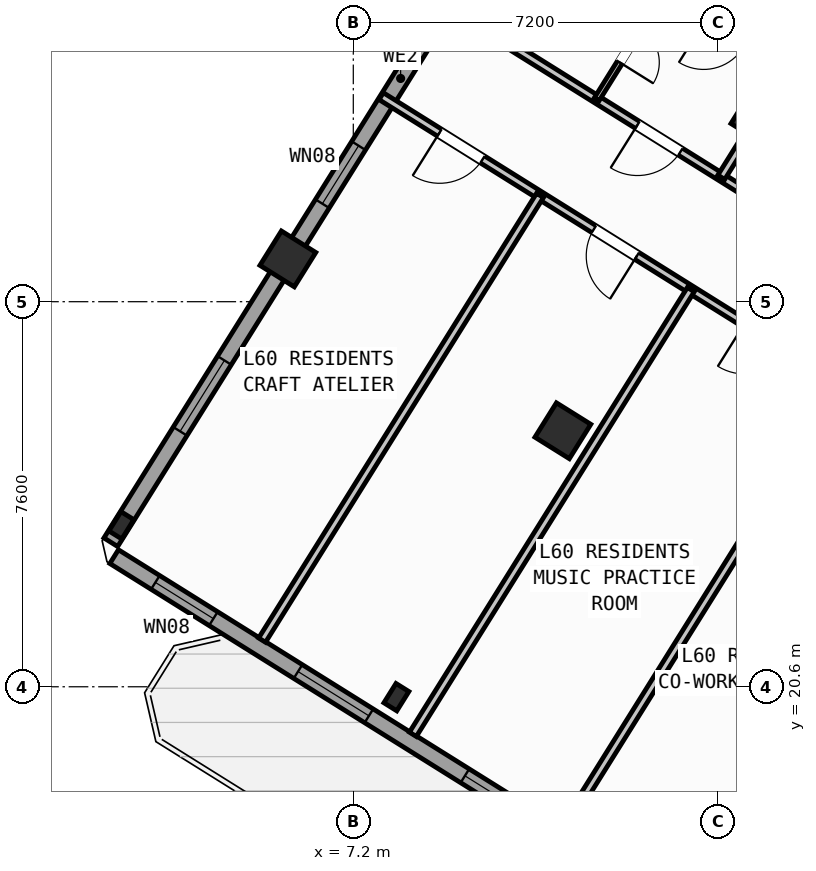
"""IFC4 building model, lengths in metres.
Left out: names, types, materials, properties, quantities, classifications, styles, units other than length and angle.
Written with IfcOpenShell. Run it as: python <this file> out.ifc"""

import sys

from ifc_helpers import new_model, si_unit, direction, frame, frame_2d, origin, origin_2d, place, context, subcontext, project, spatial, rectangle, hollow_rectangle, i_section, extrude, source, transform, mapped, element, fill, save


model = new_model("IFC4")
c1 = context("Model", 3, precision=1e-05, world=origin(), true_north=direction((0.0, 1.0)))
c2 = subcontext(c1, "Body", "Model", "MODEL_VIEW")
j1 = project(units=[si_unit("LENGTHUNIT", "METRE"), si_unit("PLANEANGLEUNIT", "RADIAN")], contexts=[c1])
p1 = place(None, origin())
s1 = spatial("IfcSite", under=j1, at=p1, CompositionType="ELEMENT")
p2 = place(p1, origin())
s2 = spatial("IfcBuilding", under=s1, at=p2, CompositionType="ELEMENT")
p3 = place(p2, frame((0.0, 0.0, 238.5)))
s3 = spatial("IfcBuildingStorey", under=s2, at=p3, CompositionType="ELEMENT", Elevation=238.5)
m1 = source(origin(), c2, "Body", "SweptSolid", [
    extrude(hollow_rectangle(XDim=0.8, YDim=0.8, WallThickness=0.032, at=origin_2d()), origin(), (0.0, 0.0, 1.0), 3.6),
])
for number, where, z_axis, x_axis in (
    (1, (15.205, 31.844, 0.0), (0.0, 0.0, 1.0), (-0.848, 0.53, 0.0)),
    (2, (11.336, 25.653, 0.0), (0.0, 0.0, 1.0), (-0.848, 0.53, 0.0)),
):
    element("IfcColumn", number, at=place(p3, frame(where, z_axis=z_axis, x_axis=x_axis)), inside=s3, PredefinedType="COLUMN", context=c2, shape_type="MappedRepresentation", body=[
        mapped(m1, transform((0.0, 0.0, 0.0), scale=1.0)),
    ])
m2 = source(origin(), c2, "Body", "SweptSolid", [
    extrude(i_section(OverallWidth=0.3, OverallDepth=0.45, WebThickness=0.014, FlangeThickness=0.026, at=origin_2d()), origin(), (0.0, 0.0, 1.0), 3.6),
])
p4 = place(p3, frame((8.051, 20.395, 0.0), z_axis=(0.0, 0.0, 1.0), x_axis=(-0.848048096156, 0.529919264233, 0.0)))
e3 = element("IfcColumn", 3, at=p4, inside=s3, PredefinedType="COLUMN", context=c2, shape_type="MappedRepresentation", body=[
    mapped(m2, transform((0.0, 0.0, 0.0), scale=1.0)),
])
p5 = place(p3, frame((5.909, 29.044, 0.0), z_axis=(0.0, 0.0, 1.0), x_axis=(-0.848048096156, 0.529919264233, 0.0)))
e4 = element("IfcColumn", 4, at=p5, inside=s3, PredefinedType="COLUMN", context=c2, shape_type="MappedRepresentation", body=[
    mapped(m1, transform((0.0, 0.0, 0.0), scale=1.0)),
])
p6 = place(p3, frame((2.623, 23.786, 0.0), z_axis=(0.0, 0.0, 1.0), x_axis=(-0.848048096156, 0.529919264233, 0.0)))
e5 = element("IfcColumn", 5, at=p6, inside=s3, PredefinedType="COLUMN", context=c2, shape_type="MappedRepresentation", body=[
    mapped(m2, transform((0.0, 0.0, 0.0), scale=1.0)),
])
p7 = place(p3, frame((29.268, 6.429, 0.0), z_axis=(0.0, 0.0, 1.0), x_axis=(-0.848049971435, 0.529916263149, 0.0)))
e6 = element("IfcWall", 6, at=p7, inside=s3, PredefinedType="STANDARD", context=c2, shape_type="SweptSolid", body=[
    extrude(rectangle(XDim=31.588, YDim=0.32, at=frame_2d((15.794, 0.0))), origin(), (0.0, 0.0, 1.0), 3.35),
])
p8 = place(p7, frame((16.235, 0.0, 0.0)))
e7 = element("IfcOpeningElement", 7, at=p8, cuts=e6, PredefinedType="OPENING", context=c2, shape_type="SweptSolid", body=[
    extrude(rectangle(XDim=1.2, YDim=2.15, at=frame_2d((0.6, 1.075))), frame((0.0, 0.17, 0.0), z_axis=(0.0, -1.0, 0.0), x_axis=(1.0, 0.0, 0.0)), (0.0, 0.0, 1.0), 0.34),
])
p9 = place(p7, frame((3.859, 0.0, 0.9)))
e8 = element("IfcOpeningElement", 8, at=p9, cuts=e6, PredefinedType="OPENING", context=c2, shape_type="SweptSolid", body=[
    extrude(rectangle(XDim=1.65, YDim=1.45, at=frame_2d((0.825, 0.725))), frame((0.0, 0.17, 0.0), z_axis=(0.0, -1.0, 0.0), x_axis=(1.0, 0.0, 0.0)), (0.0, 0.0, 1.0), 0.34),
])
p10 = place(p7, frame((10.519, 0.0, 0.9)))
e9 = element("IfcOpeningElement", 9, at=p10, cuts=e6, PredefinedType="OPENING", context=c2, shape_type="SweptSolid", body=[
    extrude(rectangle(XDim=1.65, YDim=1.45, at=frame_2d((0.825, 0.725))), frame((0.0, 0.17, 0.0), z_axis=(0.0, -1.0, 0.0), x_axis=(1.0, 0.0, 0.0)), (0.0, 0.0, 1.0), 0.34),
])
p11 = place(p7, frame((19.182, 0.0, 1.0)))
e10 = element("IfcOpeningElement", 10, at=p11, cuts=e6, PredefinedType="OPENING", context=c2, shape_type="SweptSolid", body=[
    extrude(rectangle(XDim=0.9, YDim=1.25, at=frame_2d((0.45, 0.625))), frame((0.0, 0.17, 0.0), z_axis=(0.0, -1.0, 0.0), x_axis=(1.0, 0.0, 0.0)), (0.0, 0.0, 1.0), 0.34),
])
p12 = place(p7, frame((22.524, 0.0, 1.0)))
e11 = element("IfcOpeningElement", 11, at=p12, cuts=e6, PredefinedType="OPENING", context=c2, shape_type="SweptSolid", body=[
    extrude(rectangle(XDim=0.9, YDim=1.25, at=frame_2d((0.45, 0.625))), frame((0.0, 0.17, 0.0), z_axis=(0.0, -1.0, 0.0), x_axis=(1.0, 0.0, 0.0)), (0.0, 0.0, 1.0), 0.34),
])
p13 = place(p7, frame((25.658, 0.0, 0.9)))
e12 = element("IfcOpeningElement", 12, at=p13, cuts=e6, PredefinedType="OPENING", context=c2, shape_type="SweptSolid", body=[
    extrude(rectangle(XDim=1.65, YDim=1.45, at=frame_2d((0.825, 0.725))), frame((0.0, 0.17, 0.0), z_axis=(0.0, -1.0, 0.0), x_axis=(1.0, 0.0, 0.0)), (0.0, 0.0, 1.0), 0.34),
])
p14 = place(p7, frame((29.278, 0.0, 0.9)))
e13 = element("IfcOpeningElement", 13, at=p14, cuts=e6, PredefinedType="OPENING", context=c2, shape_type="SweptSolid", body=[
    extrude(rectangle(XDim=1.35, YDim=1.45, at=frame_2d((0.675, 0.725))), frame((0.0, 0.17, 0.0), z_axis=(0.0, -1.0, 0.0), x_axis=(1.0, 0.0, 0.0)), (0.0, 0.0, 1.0), 0.34),
])
p15 = place(p3, frame((2.415, 23.452, 0.0), z_axis=(0.0, 0.0, 1.0), x_axis=(0.52991049553, 0.848053575387, 0.0)))
e14 = element("IfcWall", 14, at=p15, inside=s3, PredefinedType="STANDARD", context=c2, shape_type="SweptSolid", body=[
    extrude(rectangle(XDim=21.587, YDim=0.32, at=frame_2d((10.794, 0.0))), origin(), (0.0, 0.0, 1.0), 2.875),
])
p16 = place(p15, frame((2.581, 0.0, 0.9)))
e15 = element("IfcOpeningElement", 15, at=p16, cuts=e14, PredefinedType="OPENING", context=c2, shape_type="SweptSolid", body=[
    extrude(rectangle(XDim=1.65, YDim=1.45, at=frame_2d((0.825, 0.725))), frame((0.0, 0.17, 0.0), z_axis=(0.0, -1.0, 0.0), x_axis=(1.0, 0.0, 0.0)), (0.0, 0.0, 1.0), 0.34),
])
p17 = place(p15, frame((7.879, 0.0, 0.9)))
e16 = element("IfcOpeningElement", 16, at=p17, cuts=e14, PredefinedType="OPENING", context=c2, shape_type="SweptSolid", body=[
    extrude(rectangle(XDim=1.35, YDim=1.45, at=frame_2d((0.675, 0.725))), frame((0.0, 0.17, 0.0), z_axis=(0.0, -1.0, 0.0), x_axis=(1.0, 0.0, 0.0)), (0.0, 0.0, 1.0), 0.34),
])
p18 = place(p15, frame((16.954, 0.0, 0.95)))
e17 = element("IfcOpeningElement", 17, at=p18, cuts=e14, PredefinedType="OPENING", context=c2, shape_type="SweptSolid", body=[
    extrude(rectangle(XDim=1.95, YDim=1.35, at=frame_2d((0.975, 0.675))), frame((0.0, 0.17, 0.0), z_axis=(0.0, -1.0, 0.0), x_axis=(1.0, 0.0, 0.0)), (0.0, 0.0, 1.0), 0.34),
])
p19 = place(p3, frame((14.138, 41.825, 0.0), z_axis=(0.0, 0.0, 1.0), x_axis=(0.848046498049, -0.529921821731, 0.0)))
e18 = element("IfcWall", 18, at=p19, inside=s3, PredefinedType="STANDARD", context=c2, shape_type="SweptSolid", body=[
    extrude(rectangle(XDim=31.588, YDim=0.32, at=frame_2d((15.794, 0.0))), origin(), (0.0, 0.0, 1.0), 3.35),
])
p20 = place(p19, frame((9.712, 0.0, 0.0)))
e19 = element("IfcOpeningElement", 19, at=p20, cuts=e18, PredefinedType="OPENING", context=c2, shape_type="SweptSolid", body=[
    extrude(rectangle(XDim=1.05, YDim=2.15, at=frame_2d((0.525, 1.075))), frame((0.0, 0.17, 0.0), z_axis=(0.0, -1.0, 0.0), x_axis=(1.0, 0.0, 0.0)), (0.0, 0.0, 1.0), 0.34),
])
p21 = place(p19, frame((0.841, 0.0, 0.9)))
e20 = element("IfcOpeningElement", 20, at=p21, cuts=e18, PredefinedType="OPENING", context=c2, shape_type="SweptSolid", body=[
    extrude(rectangle(XDim=1.65, YDim=1.45, at=frame_2d((0.825, 0.725))), frame((0.0, 0.17, 0.0), z_axis=(0.0, -1.0, 0.0), x_axis=(1.0, 0.0, 0.0)), (0.0, 0.0, 1.0), 0.34),
])
p22 = place(p19, frame((4.171, 0.0, 1.0)))
e21 = element("IfcOpeningElement", 21, at=p22, cuts=e18, PredefinedType="OPENING", context=c2, shape_type="SweptSolid", body=[
    extrude(rectangle(XDim=0.9, YDim=1.25, at=frame_2d((0.45, 0.625))), frame((0.0, 0.17, 0.0), z_axis=(0.0, -1.0, 0.0), x_axis=(1.0, 0.0, 0.0)), (0.0, 0.0, 1.0), 0.34),
])
p23 = place(p19, frame((13.624, 0.0, 0.95)))
e22 = element("IfcOpeningElement", 22, at=p23, cuts=e18, PredefinedType="OPENING", context=c2, shape_type="SweptSolid", body=[
    extrude(rectangle(XDim=1.95, YDim=1.35, at=frame_2d((0.975, 0.675))), frame((0.0, 0.17, 0.0), z_axis=(0.0, -1.0, 0.0), x_axis=(1.0, 0.0, 0.0)), (0.0, 0.0, 1.0), 0.34),
])
p24 = place(p19, frame((17.129, 0.0, 1.0)))
e23 = element("IfcOpeningElement", 23, at=p24, cuts=e18, PredefinedType="OPENING", context=c2, shape_type="SweptSolid", body=[
    extrude(rectangle(XDim=0.9, YDim=1.25, at=frame_2d((0.45, 0.625))), frame((0.0, 0.17, 0.0), z_axis=(0.0, -1.0, 0.0), x_axis=(1.0, 0.0, 0.0)), (0.0, 0.0, 1.0), 0.34),
])
p25 = place(p19, frame((21.744, 0.0, 0.9)))
e24 = element("IfcOpeningElement", 24, at=p25, cuts=e18, PredefinedType="OPENING", context=c2, shape_type="SweptSolid", body=[
    extrude(rectangle(XDim=1.65, YDim=1.45, at=frame_2d((0.825, 0.725))), frame((0.0, 0.17, 0.0), z_axis=(0.0, -1.0, 0.0), x_axis=(1.0, 0.0, 0.0)), (0.0, 0.0, 1.0), 0.34),
])
p26 = place(p19, frame((27.394, 0.0, 0.9)))
e25 = element("IfcOpeningElement", 25, at=p26, cuts=e18, PredefinedType="OPENING", context=c2, shape_type="SweptSolid", body=[
    extrude(rectangle(XDim=1.65, YDim=1.45, at=frame_2d((0.825, 0.725))), frame((0.0, 0.17, 0.0), z_axis=(0.0, -1.0, 0.0), x_axis=(1.0, 0.0, 0.0)), (0.0, 0.0, 1.0), 0.34),
])
p27 = place(p3, frame((23.104, 25.256, 0.0), z_axis=(0.0, 0.0, 1.0), x_axis=(-0.848041752158, 0.529929416617, 0.0)))
e26 = element("IfcWall", 26, at=p27, inside=s3, PredefinedType="PARTITIONING", context=c2, shape_type="SweptSolid", body=[
    extrude(rectangle(XDim=16.73, YDim=0.16, at=frame_2d((8.365, 0.0))), origin(), (0.0, 0.0, 1.0), 3.34),
])
p28 = place(p27, frame((1.395, 0.0, 0.0)))
e27 = element("IfcOpeningElement", 27, at=p28, cuts=e26, PredefinedType="OPENING", context=c2, shape_type="SweptSolid", body=[
    extrude(rectangle(XDim=1.0, YDim=2.1, at=frame_2d((0.5, 1.05))), frame((0.0, 0.09, 0.0), z_axis=(0.0, -1.0, 0.0), x_axis=(1.0, 0.0, 0.0)), (0.0, 0.0, 1.0), 0.18),
])
p29 = place(p27, frame((7.82, 0.0, 0.0)))
e28 = element("IfcOpeningElement", 28, at=p29, cuts=e26, PredefinedType="OPENING", context=c2, shape_type="SweptSolid", body=[
    extrude(rectangle(XDim=1.0, YDim=2.1, at=frame_2d((0.5, 1.05))), frame((0.0, 0.09, 0.0), z_axis=(0.0, -1.0, 0.0), x_axis=(1.0, 0.0, 0.0)), (0.0, 0.0, 1.0), 0.18),
])
p30 = place(p27, frame((11.14, 0.0, 0.0)))
e29 = element("IfcOpeningElement", 29, at=p30, cuts=e26, PredefinedType="OPENING", context=c2, shape_type="SweptSolid", body=[
    extrude(rectangle(XDim=1.0, YDim=2.1, at=frame_2d((0.5, 1.05))), frame((0.0, 0.09, 0.0), z_axis=(0.0, -1.0, 0.0), x_axis=(1.0, 0.0, 0.0)), (0.0, 0.0, 1.0), 0.18),
])
p31 = place(p3, frame((21.938, 23.391, 0.0), z_axis=(0.0, 0.0, 1.0), x_axis=(-0.848045850158, 0.529922858565, 0.0)))
e30 = element("IfcWall", 30, at=p31, inside=s3, PredefinedType="PARTITIONING", context=c2, shape_type="SweptSolid", body=[
    extrude(rectangle(XDim=16.73, YDim=0.16, at=frame_2d((8.365, 0.0))), origin(), (0.0, 0.0, 1.0), 3.34),
])
p32 = place(p31, frame((0.92, 0.0, 0.0)))
e31 = element("IfcOpeningElement", 31, at=p32, cuts=e30, PredefinedType="OPENING", context=c2, shape_type="SweptSolid", body=[
    extrude(rectangle(XDim=1.0, YDim=2.1, at=frame_2d((0.5, 1.05))), frame((0.0, 0.09, 0.0), z_axis=(0.0, -1.0, 0.0), x_axis=(1.0, 0.0, 0.0)), (0.0, 0.0, 1.0), 0.18),
])
p33 = place(p31, frame((3.928, 0.0, 0.0)))
e32 = element("IfcOpeningElement", 32, at=p33, cuts=e30, PredefinedType="OPENING", context=c2, shape_type="SweptSolid", body=[
    extrude(rectangle(XDim=1.0, YDim=2.1, at=frame_2d((0.5, 1.05))), frame((0.0, 0.09, 0.0), z_axis=(0.0, -1.0, 0.0), x_axis=(1.0, 0.0, 0.0)), (0.0, 0.0, 1.0), 0.18),
])
p34 = place(p31, frame((7.271, 0.0, 0.0)))
e33 = element("IfcOpeningElement", 33, at=p34, cuts=e30, PredefinedType="OPENING", context=c2, shape_type="SweptSolid", body=[
    extrude(rectangle(XDim=1.0, YDim=2.1, at=frame_2d((0.5, 1.05))), frame((0.0, 0.09, 0.0), z_axis=(0.0, -1.0, 0.0), x_axis=(1.0, 0.0, 0.0)), (0.0, 0.0, 1.0), 0.18),
])
p35 = place(p31, frame((10.78, 0.0, 0.0)))
e34 = element("IfcOpeningElement", 34, at=p35, cuts=e30, PredefinedType="OPENING", context=c2, shape_type="SweptSolid", body=[
    extrude(rectangle(XDim=1.0, YDim=2.1, at=frame_2d((0.5, 1.05))), frame((0.0, 0.09, 0.0), z_axis=(0.0, -1.0, 0.0), x_axis=(1.0, 0.0, 0.0)), (0.0, 0.0, 1.0), 0.18),
])
p36 = place(p31, frame((14.372, 0.0, 0.0)))
e35 = element("IfcOpeningElement", 35, at=p36, cuts=e30, PredefinedType="OPENING", context=c2, shape_type="SweptSolid", body=[
    extrude(rectangle(XDim=1.0, YDim=2.1, at=frame_2d((0.5, 1.05))), frame((0.0, 0.09, 0.0), z_axis=(0.0, -1.0, 0.0), x_axis=(1.0, 0.0, 0.0)), (0.0, 0.0, 1.0), 0.18),
])
p37 = place(p3, frame((19.529, 24.896, 0.0), z_axis=(0.0, 0.0, 1.0), x_axis=(-0.529914125013, -0.848051307476, 0.0)))
e36 = element("IfcWall", 36, at=p37, inside=s3, PredefinedType="PARTITIONING", context=c2, shape_type="SweptSolid", body=[
    extrude(rectangle(XDim=10.35, YDim=0.16, at=frame_2d((5.175, 0.0))), origin(), (0.0, 0.0, 1.0), 3.34),
])
p38 = place(p3, frame((16.837, 26.579, 0.0), z_axis=(0.0, 0.0, 1.0), x_axis=(-0.529941690036, -0.848034082547, 0.0)))
e37 = element("IfcWall", 37, at=p38, inside=s3, PredefinedType="PARTITIONING", context=c2, shape_type="SweptSolid", body=[
    extrude(rectangle(XDim=10.35, YDim=0.16, at=frame_2d((5.175, 0.0))), origin(), (0.0, 0.0, 1.0), 3.025),
])
p39 = place(p3, frame((13.861, 28.438, 0.0), z_axis=(0.0, 0.0, 1.0), x_axis=(-0.529931089283, -0.848040706931, 0.0)))
e38 = element("IfcWall", 38, at=p39, inside=s3, PredefinedType="PARTITIONING", context=c2, shape_type="SweptSolid", body=[
    extrude(rectangle(XDim=10.35, YDim=0.16, at=frame_2d((5.175, 0.0))), origin(), (0.0, 0.0, 1.0), 3.34),
])
p40 = place(p3, frame((10.885, 30.298, 0.0), z_axis=(0.0, 0.0, 1.0), x_axis=(-0.529924725692, -0.848044683434, 0.0)))
e39 = element("IfcWall", 39, at=p40, inside=s3, PredefinedType="PARTITIONING", context=c2, shape_type="SweptSolid", body=[
    extrude(rectangle(XDim=10.35, YDim=0.16, at=frame_2d((5.175, 0.0))), origin(), (0.0, 0.0, 1.0), 3.34),
])
p41 = place(p3, frame((14.986, 31.494, 0.0), z_axis=(0.0, 0.0, 1.0), x_axis=(-0.529821225456, -0.848109349704, 0.0)))
e40 = element("IfcWall", 40, at=p41, inside=s3, PredefinedType="PARTITIONING", context=c2, shape_type="SweptSolid", body=[
    extrude(rectangle(XDim=0.988, YDim=0.16, at=frame_2d((0.494, 0.0))), origin(), (0.0, 0.0, 1.0), 2.875),
])
p42 = place(p3, frame((16.995, 40.182, 0.0), z_axis=(0.0, 0.0, 1.0), x_axis=(-0.529931378574, -0.848040526156, 0.0)))
e41 = element("IfcWall", 41, at=p42, inside=s3, PredefinedType="PARTITIONING", context=c2, shape_type="SweptSolid", body=[
    extrude(rectangle(XDim=9.42, YDim=0.11, at=frame_2d((4.71, 0.0))), origin(), (0.0, 0.0, 1.0), 3.34),
])
p43 = place(p42, frame((7.78, 0.0, 0.0)))
e42 = element("IfcOpeningElement", 42, at=p43, cuts=e41, PredefinedType="OPENING", context=c2, shape_type="SweptSolid", body=[
    extrude(rectangle(XDim=0.78, YDim=2.05, at=frame_2d((0.39, 1.025))), frame((0.0, 0.065, 0.0), z_axis=(0.0, -1.0, 0.0), x_axis=(1.0, 0.0, 0.0)), (0.0, 0.0, 1.0), 0.13),
])
p44 = place(p42, frame((3.05, 0.0, 0.0)))
e43 = element("IfcOpeningElement", 43, at=p44, cuts=e41, PredefinedType="OPENING", context=c2, shape_type="SweptSolid", body=[
    extrude(rectangle(XDim=0.92, YDim=2.08, at=frame_2d((0.46, 1.04))), frame((0.0, 0.065, 0.0), z_axis=(0.0, -1.0, 0.0), x_axis=(1.0, 0.0, 0.0)), (0.0, 0.0, 1.0), 0.13),
])
p45 = place(p3, frame((15.734, 32.692, 0.0), z_axis=(0.0, 0.0, 1.0), x_axis=(-0.848059786386, 0.529900555496, 0.0)))
e44 = element("IfcWall", 44, at=p45, inside=s3, PredefinedType="PLUMBINGWALL", context=c2, shape_type="SweptSolid", body=[
    extrude(rectangle(XDim=2.9, YDim=0.14, at=frame_2d((1.45, 0.0))), origin(), (0.0, 0.0, 1.0), 3.34),
])
p46 = place(p45, frame((0.99, 0.0, 0.0)))
e45 = element("IfcOpeningElement", 45, at=p46, cuts=e44, PredefinedType="OPENING", context=c2, shape_type="SweptSolid", body=[
    extrude(rectangle(XDim=0.92, YDim=2.08, at=frame_2d((0.46, 1.04))), frame((0.0, 0.08, 0.0), z_axis=(0.0, -1.0, 0.0), x_axis=(1.0, 0.0, 0.0)), (0.0, 0.0, 1.0), 0.16),
])
m3 = source(origin(), c2, "Body", "SweptSolid", [
    extrude(rectangle(XDim=0.9, YDim=1.25, at=frame_2d((0.45, 0.625))), frame((0.0, 0.03, 0.0), z_axis=(0.0, -1.0, 0.0), x_axis=(1.0, 0.0, 0.0)), (0.0, 0.0, 1.0), 0.06),
])
p47 = place(p12, origin())
e46 = element("IfcWindow", 46, at=p47, inside=s3, PartitioningType="SINGLE_PANEL", PredefinedType="WINDOW", context=c2, shape_type="MappedRepresentation", body=[
    mapped(m3, transform((0.0, 0.0, 0.0), scale=1.0)),
])
fill(e11, e46)
m4 = source(origin(), c2, "Body", "SweptSolid", [
    extrude(rectangle(XDim=1.65, YDim=1.45, at=frame_2d((0.825, 0.725))), frame((0.0, 0.03, 0.0), z_axis=(0.0, -1.0, 0.0), x_axis=(1.0, 0.0, 0.0)), (0.0, 0.0, 1.0), 0.06),
])
p48 = place(p13, origin())
e47 = element("IfcWindow", 47, at=p48, inside=s3, PartitioningType="SINGLE_PANEL", PredefinedType="WINDOW", context=c2, shape_type="MappedRepresentation", body=[
    mapped(m4, transform((0.0, 0.0, 0.0), scale=1.0)),
])
fill(e12, e47)
m5 = source(origin(), c2, "Body", "SweptSolid", [
    extrude(rectangle(XDim=1.35, YDim=1.45, at=frame_2d((0.675, 0.725))), frame((0.0, 0.03, 0.0), z_axis=(0.0, -1.0, 0.0), x_axis=(1.0, 0.0, 0.0)), (0.0, 0.0, 1.0), 0.06),
])
p49 = place(p14, origin())
e48 = element("IfcWindow", 48, at=p49, inside=s3, PartitioningType="SINGLE_PANEL", PredefinedType="WINDOW", context=c2, shape_type="MappedRepresentation", body=[
    mapped(m5, transform((0.0, 0.0, 0.0), scale=1.0)),
])
fill(e13, e48)
p50 = place(p16, origin())
e49 = element("IfcWindow", 49, at=p50, inside=s3, PartitioningType="SINGLE_PANEL", PredefinedType="WINDOW", context=c2, shape_type="MappedRepresentation", body=[
    mapped(m4, transform((0.0, 0.0, 0.0), scale=1.0)),
])
fill(e15, e49)
p51 = place(p17, origin())
e50 = element("IfcWindow", 50, at=p51, inside=s3, PartitioningType="SINGLE_PANEL", PredefinedType="WINDOW", context=c2, shape_type="MappedRepresentation", body=[
    mapped(m5, transform((0.0, 0.0, 0.0), scale=1.0)),
])
fill(e16, e50)
m6 = source(origin(), c2, "Body", "SweptSolid", [
    extrude(rectangle(XDim=1.0, YDim=2.1, at=frame_2d((0.5, 1.05))), frame((0.0, 0.025, 0.0), z_axis=(0.0, -1.0, 0.0), x_axis=(1.0, 0.0, 0.0)), (0.0, 0.0, 1.0), 0.05),
])
p52 = place(p35, origin())
e51 = element("IfcDoor", 51, at=p52, inside=s3, OperationType="SINGLE_SWING_LEFT", PredefinedType="DOOR", context=c2, shape_type="MappedRepresentation", body=[
    mapped(m6, transform((0.0, 0.0, 0.0), scale=1.0)),
])
fill(e34, e51)
p53 = place(p36, origin())
e52 = element("IfcDoor", 52, at=p53, inside=s3, OperationType="SINGLE_SWING_RIGHT", PredefinedType="DOOR", context=c2, shape_type="MappedRepresentation", body=[
    mapped(m6, transform((0.0, 0.0, 0.0), scale=1.0)),
])
fill(e35, e52)
p54 = place(p30, origin())
e53 = element("IfcDoor", 53, at=p54, inside=s3, OperationType="SINGLE_SWING_RIGHT", PredefinedType="DOOR", context=c2, shape_type="MappedRepresentation", body=[
    mapped(m6, transform((0.0, 0.0, 0.0), scale=1.0)),
])
fill(e29, e53)
m7 = source(origin(), c2, "Body", "SweptSolid", [
    extrude(rectangle(XDim=0.78, YDim=2.05, at=frame_2d((0.39, 1.025))), frame((0.0, 0.025, 0.0), z_axis=(0.0, -1.0, 0.0), x_axis=(1.0, 0.0, 0.0)), (0.0, 0.0, 1.0), 0.05),
])
p55 = place(p43, origin())
e54 = element("IfcDoor", 54, at=p55, inside=s3, OperationType="SINGLE_SWING_RIGHT", PredefinedType="DOOR", context=c2, shape_type="MappedRepresentation", body=[
    mapped(m7, transform((0.0, 0.0, 0.0), scale=1.0)),
])
fill(e42, e54)
save(model, sys.argv[1])
